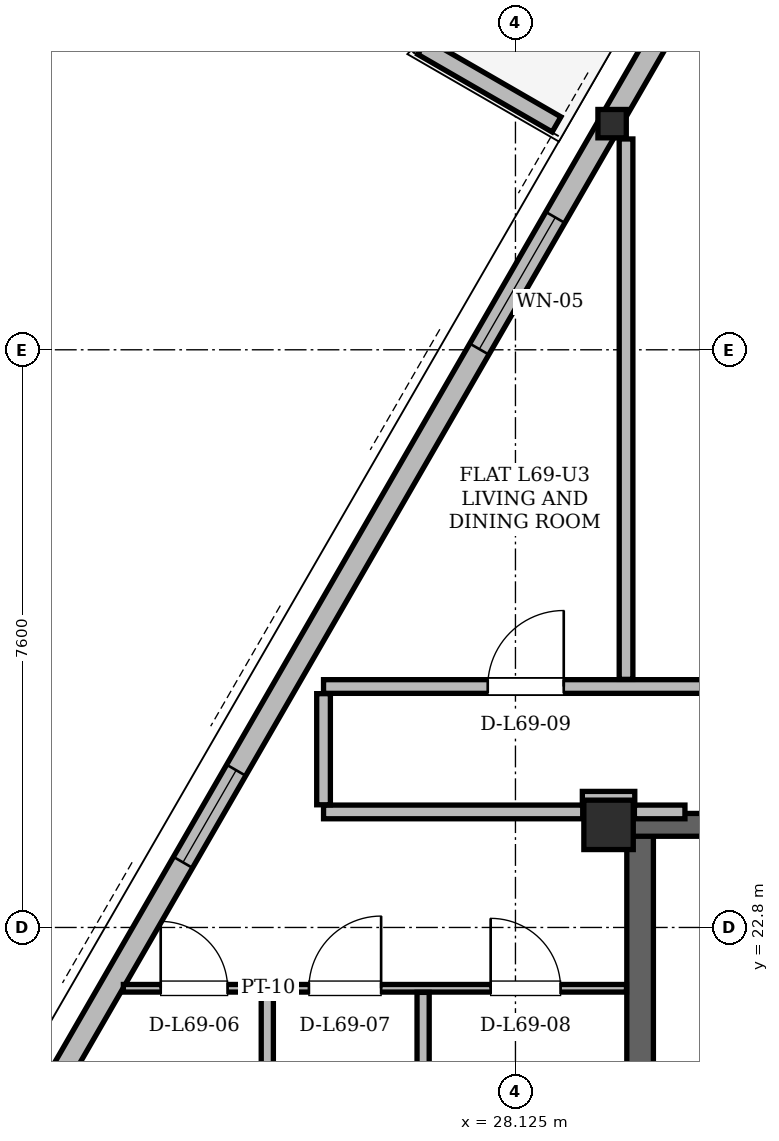
"""IFC4 building model, lengths in metres.
Left out: names, types, materials, properties, quantities, classifications, styles, units other than length and angle.
Written with IfcOpenShell. Run it as: python <this file> out.ifc"""

import sys

from ifc_helpers import new_model, si_unit, direction, frame, frame_2d, origin, origin_2d, place, context, subcontext, project, spatial, polyline, rectangle, hollow_rectangle, i_section, outline, extrude, element, fill, save


model = new_model("IFC4")
c1 = context("Model", 3, precision=1e-05, world=origin(), true_north=direction((0.0, 1.0)))
c2 = subcontext(c1, "Body", "Model", "MODEL_VIEW")
j1 = project(units=[si_unit("LENGTHUNIT", "METRE"), si_unit("PLANEANGLEUNIT", "RADIAN")], contexts=[c1])
p1 = place(None, origin())
s1 = spatial("IfcSite", under=j1, at=p1, CompositionType="ELEMENT")
p2 = place(p1, origin())
s2 = spatial("IfcBuilding", under=s1, at=p2, CompositionType="ELEMENT")
p3 = place(p2, frame((0.0, 0.0, 261.6)))
s3 = spatial("IfcBuildingStorey", under=s2, at=p3, CompositionType="ELEMENT", Elevation=261.6)
p4 = place(p3, frame((29.35, 24.15, 0.0), z_axis=(0.0, 0.0, 1.0), x_axis=(1.0, 0.0, 0.0)))
e1 = element("IfcColumn", 1, at=p4, inside=s3, PredefinedType="COLUMN", context=c2, shape_type="SweptSolid", body=[
    extrude(hollow_rectangle(XDim=0.65, YDim=0.65, WallThickness=0.05, at=origin_2d()), origin(), (0.0, 0.0, 1.0), 3.9),
])
p5 = place(p3, frame((29.368, 33.386, 0.004), z_axis=(0.014680081359, -0.005583449748, 0.999876652543), x_axis=(0.355496972179, 0.934677432471, 0.0)))
e2 = element("IfcColumn", 2, at=p5, inside=s3, PredefinedType="COLUMN", context=c2, shape_type="SweptSolid", body=[
    extrude(i_section(OverallWidth=0.373, OverallDepth=0.373, WebThickness=0.016, FlangeThickness=0.026, at=origin_2d()), origin(), (0.0, 0.0, 1.0), 3.892),
])
p6 = place(p3, frame((29.765, 11.0, 0.0), z_axis=(0.0, 0.0, 1.0), x_axis=(0.0, 1.0, 0.0)))
e3 = element("IfcWall", 3, at=p6, inside=s3, PredefinedType="SHEAR", context=c2, shape_type="SweptSolid", body=[
    extrude(rectangle(XDim=13.3, YDim=0.35, at=frame_2d((6.65, 0.0))), origin(), (0.0, 0.0, 1.0), 3.68),
])
p7 = place(p3, frame((29.65, 24.15, 0.0), z_axis=(0.0, 0.0, 1.0), x_axis=(1.0, 0.0, 0.0)))
e4 = element("IfcWall", 4, at=p7, inside=s3, PredefinedType="SHEAR", context=c2, shape_type="SweptSolid", body=[
    extrude(rectangle(XDim=15.7, YDim=0.3, at=frame_2d((7.85, 0.0))), origin(), (0.0, 0.0, 1.0), 3.68),
])
p8 = place(p7, frame((1.7, 0.0, 0.0)))
e5 = element("IfcOpeningElement", 5, at=p8, cuts=e4, PredefinedType="OPENING", context=c2, shape_type="SweptSolid", body=[
    extrude(rectangle(XDim=1.2, YDim=2.2, at=frame_2d((0.6, 1.1))), frame((0.0, 0.15, 0.0), z_axis=(0.0, -1.0, 0.0), x_axis=(1.0, 0.0, 0.0)), (0.0, 0.0, 1.0), 0.3),
])
p9 = place(p7, frame((12.8, 0.0, 0.0)))
e6 = element("IfcOpeningElement", 6, at=p9, cuts=e4, PredefinedType="OPENING", context=c2, shape_type="SweptSolid", body=[
    extrude(rectangle(XDim=1.2, YDim=2.2, at=frame_2d((0.6, 1.1))), frame((0.0, 0.15, 0.0), z_axis=(0.0, -1.0, 0.0), x_axis=(1.0, 0.0, 0.0)), (0.0, 0.0, 1.0), 0.3),
])
p10 = place(p7, frame((6.55, 0.0, 0.0)))
e7 = element("IfcOpeningElement", 7, at=p10, cuts=e4, PredefinedType="OPENING", context=c2, shape_type="SweptSolid", body=[
    extrude(rectangle(XDim=0.9, YDim=2.05, at=frame_2d((0.45, 1.025))), frame((0.0, 0.15, 0.0), z_axis=(0.0, -1.0, 0.0), x_axis=(1.0, 0.0, 0.0)), (0.0, 0.0, 1.0), 0.3),
])
p11 = place(p7, frame((8.45, 0.0, 0.0)))
e8 = element("IfcOpeningElement", 8, at=p11, cuts=e4, PredefinedType="OPENING", context=c2, shape_type="SweptSolid", body=[
    extrude(rectangle(XDim=0.9, YDim=2.05, at=frame_2d((0.45, 1.025))), frame((0.0, 0.15, 0.0), z_axis=(0.0, -1.0, 0.0), x_axis=(1.0, 0.0, 0.0)), (0.0, 0.0, 1.0), 0.3),
])
p12 = place(p3, frame((34.948, 43.051, 0.0), z_axis=(0.0, 0.0, 1.0), x_axis=(-0.500002906693, -0.866023725598, 0.0)))
e9 = element("IfcWall", 9, at=p12, inside=s3, PredefinedType="SOLIDWALL", context=c2, shape_type="SweptSolid", body=[
    extrude(rectangle(XDim=37.2, YDim=0.29, at=frame_2d((18.6, 0.0))), origin(), (0.0, 0.0, 1.0), 3.058),
])
p13 = place(p12, frame((8.034, 0.0, 0.0)))
e10 = element("IfcOpeningElement", 10, at=p13, cuts=e9, PredefinedType="OPENING", context=c2, shape_type="SweptSolid", body=[
    extrude(rectangle(XDim=1.5, YDim=2.2, at=frame_2d((0.75, 1.1))), frame((0.0, 0.145, 0.0), z_axis=(0.0, -1.0, 0.0), x_axis=(1.0, 0.0, 0.0)), (0.0, 0.0, 1.0), 0.29),
])
p14 = place(p12, frame((32.061, 0.0, 0.0)))
e11 = element("IfcOpeningElement", 11, at=p14, cuts=e9, PredefinedType="OPENING", context=c2, shape_type="SweptSolid", body=[
    extrude(rectangle(XDim=1.5, YDim=2.2, at=frame_2d((0.75, 1.1))), frame((0.0, 0.145, 0.0), z_axis=(0.0, -1.0, 0.0), x_axis=(1.0, 0.0, 0.0)), (0.0, 0.0, 1.0), 0.29),
])
p15 = place(p12, frame((35.104, 0.0, 0.85)))
e12 = element("IfcOpeningElement", 12, at=p15, cuts=e9, PredefinedType="OPENING", context=c2, shape_type="SweptSolid", body=[
    extrude(rectangle(XDim=1.2, YDim=1.48, at=frame_2d((0.6, 0.74))), frame((0.0, 0.145, 0.0), z_axis=(0.0, -1.0, 0.0), x_axis=(1.0, 0.0, 0.0)), (0.0, 0.0, 1.0), 0.29),
])
p16 = place(p12, frame((12.597, 0.0, 0.85)))
e13 = element("IfcOpeningElement", 13, at=p16, cuts=e9, PredefinedType="OPENING", context=c2, shape_type="SweptSolid", body=[
    extrude(rectangle(XDim=2.0, YDim=1.8, at=frame_2d((1.0, 0.9))), frame((0.0, 0.145, 0.0), z_axis=(0.0, -1.0, 0.0), x_axis=(1.0, 0.0, 0.0)), (0.0, 0.0, 1.0), 0.29),
])
p17 = place(p12, frame((20.995, 0.0, 0.85)))
e14 = element("IfcOpeningElement", 14, at=p17, cuts=e9, PredefinedType="OPENING", context=c2, shape_type="SweptSolid", body=[
    extrude(rectangle(XDim=1.4, YDim=1.6, at=frame_2d((0.7, 0.8))), frame((0.0, 0.145, 0.0), z_axis=(0.0, -1.0, 0.0), x_axis=(1.0, 0.0, 0.0)), (0.0, 0.0, 1.0), 0.29),
])
p18 = place(p12, frame((27.454, 0.0, 0.85)))
e15 = element("IfcOpeningElement", 15, at=p18, cuts=e9, PredefinedType="OPENING", context=c2, shape_type="SweptSolid", body=[
    extrude(rectangle(XDim=1.2, YDim=1.48, at=frame_2d((0.6, 0.74))), frame((0.0, 0.145, 0.0), z_axis=(0.0, -1.0, 0.0), x_axis=(1.0, 0.0, 0.0)), (0.0, 0.0, 1.0), 0.29),
])
p19 = place(p12, frame((2.415, 0.0, 0.85)))
e16 = element("IfcOpeningElement", 16, at=p19, cuts=e9, PredefinedType="OPENING", context=c2, shape_type="SweptSolid", body=[
    extrude(rectangle(XDim=2.6, YDim=1.95, at=frame_2d((1.3, 0.975))), frame((0.0, 0.145, 0.0), z_axis=(0.0, -1.0, 0.0), x_axis=(1.0, 0.0, 0.0)), (0.0, 0.0, 1.0), 0.29),
])
p20 = place(p3, frame((28.665, 33.365, 0.0), z_axis=(0.0, 0.0, 1.0), x_axis=(-0.866012356593, 0.500022597718, 0.0)))
e17 = element("IfcWall", 17, at=p20, inside=s3, PredefinedType="PARAPET", context=c2, shape_type="SweptSolid", body=[
    extrude(outline(polyline([(0.0, 0.0), (2.042, 0.0), (2.042, 1.1), (0.0, 1.32), (0.0, 0.0)])), frame((0.0, 0.115, 0.0), z_axis=(0.0, -1.0, 0.0), x_axis=(1.0, 0.0, 0.0)), (0.0, 0.0, 1.0), 0.23),
])
p21 = place(p3, frame((22.966, 22.0, 0.0), z_axis=(0.0, 0.0, 1.0), x_axis=(1.0, 0.0, 0.0)))
e18 = element("IfcWall", 18, at=p21, inside=s3, PredefinedType="PARTITIONING", context=c2, shape_type="SweptSolid", body=[
    extrude(rectangle(XDim=6.62, YDim=0.1, at=frame_2d((3.31, 0.0))), origin(), (0.0, 0.0, 1.0), 2.82),
])
p22 = place(p21, frame((0.491, 0.0, 0.0)))
e19 = element("IfcOpeningElement", 19, at=p22, cuts=e18, PredefinedType="OPENING", context=c2, shape_type="SweptSolid", body=[
    extrude(rectangle(XDim=0.88, YDim=2.08, at=frame_2d((0.44, 1.04))), frame((0.0, 0.05, 0.0), z_axis=(0.0, -1.0, 0.0), x_axis=(1.0, 0.0, 0.0)), (0.0, 0.0, 1.0), 0.1),
])
p23 = place(p21, frame((2.441, 0.0, 0.0)))
e20 = element("IfcOpeningElement", 20, at=p23, cuts=e18, PredefinedType="OPENING", context=c2, shape_type="SweptSolid", body=[
    extrude(rectangle(XDim=0.95, YDim=2.1, at=frame_2d((0.475, 1.05))), frame((0.0, 0.05, 0.0), z_axis=(0.0, -1.0, 0.0), x_axis=(1.0, 0.0, 0.0)), (0.0, 0.0, 1.0), 0.1),
])
p24 = place(p21, frame((4.833, 0.0, 0.0)))
e21 = element("IfcOpeningElement", 21, at=p24, cuts=e18, PredefinedType="OPENING", context=c2, shape_type="SweptSolid", body=[
    extrude(rectangle(XDim=0.92, YDim=2.12, at=frame_2d((0.46, 1.06))), frame((0.0, 0.05, 0.0), z_axis=(0.0, -1.0, 0.0), x_axis=(1.0, 0.0, 0.0)), (0.0, 0.0, 1.0), 0.1),
])
p25 = place(p3, frame((25.6, 24.32, 0.0), z_axis=(0.0, 0.0, 1.0), x_axis=(1.0, 0.0, 0.0)))
e22 = element("IfcWall", 22, at=p25, inside=s3, PredefinedType="PARTITIONING", context=c2, shape_type="SweptSolid", body=[
    extrude(rectangle(XDim=3.41, YDim=0.18, at=frame_2d((1.705, 0.0))), origin(), (0.0, 0.0, 1.0), 3.68),
])
p26 = place(p3, frame((29.69, 24.32, 0.0), z_axis=(0.0, 0.0, 1.0), x_axis=(1.0, 0.0, 0.0)))
e23 = element("IfcWall", 23, at=p26, inside=s3, PredefinedType="PARTITIONING", context=c2, shape_type="SweptSolid", body=[
    extrude(rectangle(XDim=0.665, YDim=0.18, at=frame_2d((0.333, 0.0))), origin(), (0.0, 0.0, 1.0), 2.82),
])
p27 = place(p3, frame((29.005, 24.5, 0.0), z_axis=(0.0, 0.0, 1.0), x_axis=(1.0, 0.0, 0.0)))
e24 = element("IfcWall", 24, at=p27, inside=s3, PredefinedType="PARTITIONING", context=c2, shape_type="SweptSolid", body=[
    extrude(rectangle(XDim=0.69, YDim=0.18, at=frame_2d((0.345, 0.0))), origin(), (0.0, 0.0, 1.0), 3.266),
])
p28 = place(p3, frame((25.6, 25.97, 0.0), z_axis=(0.0, 0.0, 1.0), x_axis=(1.0, 0.0, 0.0)))
e25 = element("IfcWall", 25, at=p28, inside=s3, PredefinedType="PARTITIONING", context=c2, shape_type="SweptSolid", body=[
    extrude(rectangle(XDim=21.85, YDim=0.18, at=frame_2d((10.925, 0.0))), origin(), (0.0, 0.0, 1.0), 3.266),
])
p29 = place(p28, frame((2.16, 0.0, 0.0)))
e26 = element("IfcOpeningElement", 26, at=p29, cuts=e25, PredefinedType="OPENING", context=c2, shape_type="SweptSolid", body=[
    extrude(rectangle(XDim=1.0, YDim=2.18, at=frame_2d((0.5, 1.09))), frame((0.0, 0.09, 0.0), z_axis=(0.0, -1.0, 0.0), x_axis=(1.0, 0.0, 0.0)), (0.0, 0.0, 1.0), 0.18),
])
p30 = place(p28, frame((5.991, 0.0, 0.0)))
e27 = element("IfcOpeningElement", 27, at=p30, cuts=e25, PredefinedType="OPENING", context=c2, shape_type="SweptSolid", body=[
    extrude(rectangle(XDim=1.0, YDim=2.18, at=frame_2d((0.5, 1.09))), frame((0.0, 0.09, 0.0), z_axis=(0.0, -1.0, 0.0), x_axis=(1.0, 0.0, 0.0)), (0.0, 0.0, 1.0), 0.18),
])
p31 = place(p28, frame((15.35, 0.0, 0.0)))
e28 = element("IfcOpeningElement", 28, at=p31, cuts=e25, PredefinedType="OPENING", context=c2, shape_type="SweptSolid", body=[
    extrude(rectangle(XDim=1.3, YDim=2.2, at=frame_2d((0.65, 1.1))), frame((0.0, 0.09, 0.0), z_axis=(0.0, -1.0, 0.0), x_axis=(1.0, 0.0, 0.0)), (0.0, 0.0, 1.0), 0.18),
])
p32 = place(p28, frame((18.94, 0.0, 0.0)))
e29 = element("IfcOpeningElement", 29, at=p32, cuts=e25, PredefinedType="OPENING", context=c2, shape_type="SweptSolid", body=[
    extrude(rectangle(XDim=1.0, YDim=2.18, at=frame_2d((0.5, 1.09))), frame((0.0, 0.09, 0.0), z_axis=(0.0, -1.0, 0.0), x_axis=(1.0, 0.0, 0.0)), (0.0, 0.0, 1.0), 0.18),
])
p33 = place(p3, frame((24.86, 17.744, 0.0), z_axis=(0.0, 0.0, 1.0), x_axis=(0.0, 1.0, 0.0)))
e30 = element("IfcWall", 30, at=p33, inside=s3, PredefinedType="PARTITIONING", context=c2, shape_type="SweptSolid", body=[
    extrude(rectangle(XDim=4.202, YDim=0.16, at=frame_2d((2.101, 0.0))), origin(), (0.0, 0.0, 1.0), 3.68),
])
p34 = place(p3, frame((25.6, 24.414, 0.0), z_axis=(0.0, 0.0, 1.0), x_axis=(0.0, 1.0, 0.0)))
e31 = element("IfcWall", 31, at=p34, inside=s3, PredefinedType="PARTITIONING", context=c2, shape_type="SweptSolid", body=[
    extrude(rectangle(XDim=1.462, YDim=0.18, at=frame_2d((0.731, 0.0))), origin(), (0.0, 0.0, 1.0), 3.68),
])
p35 = place(p3, frame((26.91, 17.744, 0.0), z_axis=(0.0, 0.0, 1.0), x_axis=(0.0, 1.0, 0.0)))
e32 = element("IfcWall", 32, at=p35, inside=s3, PredefinedType="PARTITIONING", context=c2, shape_type="SweptSolid", body=[
    extrude(rectangle(XDim=4.202, YDim=0.16, at=frame_2d((2.101, 0.0))), origin(), (0.0, 0.0, 1.0), 3.68),
])
p36 = place(p3, frame((29.58, 26.064, 0.0), z_axis=(0.0, 0.0, 1.0), x_axis=(0.0, 1.0, 0.0)))
e33 = element("IfcWall", 33, at=p36, inside=s3, PredefinedType="PARTITIONING", context=c2, shape_type="SweptSolid", body=[
    extrude(rectangle(XDim=7.11, YDim=0.18, at=frame_2d((3.555, 0.0))), origin(), (0.0, 0.0, 1.0), 3.68),
])
p37 = place(p16, origin())
e34 = element("IfcWindow", 34, at=p37, inside=s3, PartitioningType="SINGLE_PANEL", PredefinedType="WINDOW", context=c2, shape_type="SweptSolid", body=[
    extrude(rectangle(XDim=2.0, YDim=1.8, at=frame_2d((1.0, 0.9))), frame((0.0, 0.03, 0.0), z_axis=(0.0, -1.0, 0.0), x_axis=(1.0, 0.0, 0.0)), (0.0, 0.0, 1.0), 0.06),
])
fill(e13, e34)
p38 = place(p17, origin())
e35 = element("IfcWindow", 35, at=p38, inside=s3, PartitioningType="SINGLE_PANEL", PredefinedType="WINDOW", context=c2, shape_type="SweptSolid", body=[
    extrude(rectangle(XDim=1.4, YDim=1.6, at=frame_2d((0.7, 0.8))), frame((0.0, 0.03, 0.0), z_axis=(0.0, -1.0, 0.0), x_axis=(1.0, 0.0, 0.0)), (0.0, 0.0, 1.0), 0.06),
])
fill(e14, e35)
p39 = place(p22, origin())
e36 = element("IfcDoor", 36, at=p39, inside=s3, OperationType="SINGLE_SWING_LEFT", PredefinedType="DOOR", context=c2, shape_type="SweptSolid", body=[
    extrude(rectangle(XDim=0.88, YDim=2.08, at=frame_2d((0.44, 1.04))), frame((0.0, 0.025, 0.0), z_axis=(0.0, -1.0, 0.0), x_axis=(1.0, 0.0, 0.0)), (0.0, 0.0, 1.0), 0.05),
])
fill(e19, e36)
p40 = place(p23, origin())
e37 = element("IfcDoor", 37, at=p40, inside=s3, OperationType="SINGLE_SWING_RIGHT", PredefinedType="DOOR", context=c2, shape_type="SweptSolid", body=[
    extrude(rectangle(XDim=0.95, YDim=2.1, at=frame_2d((0.475, 1.05))), frame((0.0, 0.025, 0.0), z_axis=(0.0, -1.0, 0.0), x_axis=(1.0, 0.0, 0.0)), (0.0, 0.0, 1.0), 0.05),
])
fill(e20, e37)
p41 = place(p24, origin())
e38 = element("IfcDoor", 38, at=p41, inside=s3, OperationType="SINGLE_SWING_LEFT", PredefinedType="DOOR", context=c2, shape_type="SweptSolid", body=[
    extrude(rectangle(XDim=0.92, YDim=2.12, at=frame_2d((0.46, 1.06))), frame((0.0, 0.025, 0.0), z_axis=(0.0, -1.0, 0.0), x_axis=(1.0, 0.0, 0.0)), (0.0, 0.0, 1.0), 0.05),
])
fill(e21, e38)
p42 = place(p29, origin())
e39 = element("IfcDoor", 39, at=p42, inside=s3, OperationType="SINGLE_SWING_RIGHT", PredefinedType="DOOR", context=c2, shape_type="SweptSolid", body=[
    extrude(rectangle(XDim=1.0, YDim=2.18, at=frame_2d((0.5, 1.09))), frame((0.0, 0.025, 0.0), z_axis=(0.0, -1.0, 0.0), x_axis=(1.0, 0.0, 0.0)), (0.0, 0.0, 1.0), 0.05),
])
fill(e26, e39)
save(model, sys.argv[1])
